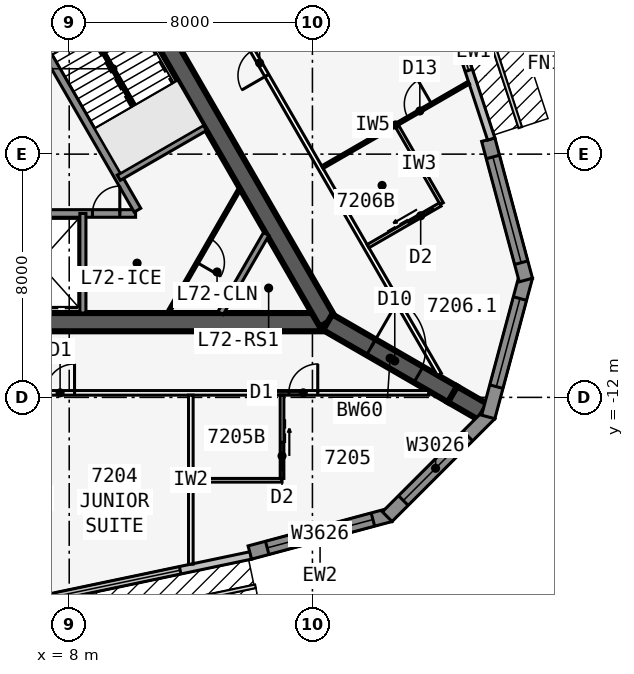
"""IFC4 building model, lengths in metres.
Left out: names, types, materials, properties, quantities, classifications, styles, units other than length and angle.
Written with IfcOpenShell. Run it as: python <this file> out.ifc"""

import sys

from ifc_helpers import new_model, si_unit, direction, frame, frame_2d, origin, place, context, subcontext, project, spatial, polyline, rectangle, outline, extrude, element, fill, save


model = new_model("IFC4")
c1 = context("Model", 3, precision=1e-05, world=origin(), true_north=direction((0.0, 1.0)))
c2 = subcontext(c1, "Body", "Model", "MODEL_VIEW")
j1 = project(units=[si_unit("LENGTHUNIT", "METRE"), si_unit("PLANEANGLEUNIT", "RADIAN")], contexts=[c1])
p1 = place(None, origin())
s1 = spatial("IfcSite", under=j1, at=p1, CompositionType="ELEMENT")
p2 = place(p1, origin())
s2 = spatial("IfcBuilding", under=s1, at=p2, CompositionType="ELEMENT")
p3 = place(p2, frame((0.0, 0.0, 271.7)))
s3 = spatial("IfcBuildingStorey", under=s2, at=p3, CompositionType="ELEMENT", Elevation=271.7)
p4 = place(p3, frame((-16.5, -9.526, 0.0), z_axis=(0.0, 0.0, 1.0), x_axis=(1.0, 0.0, 0.0)))
e1 = element("IfcWall", 1, at=p4, inside=s3, PredefinedType="SHEAR", context=c2, shape_type="SweptSolid", body=[
    extrude(rectangle(XDim=33.0, YDim=0.6, at=frame_2d((16.5, 0.0))), origin(), (0.0, 0.0, 1.0), 3.6),
])
p5 = place(p4, frame((14.05, 0.0, 0.0)))
e2 = element("IfcOpeningElement", 2, at=p5, cuts=e1, PredefinedType="OPENING", context=c2, shape_type="SweptSolid", body=[
    extrude(rectangle(XDim=1.8, YDim=2.13, at=frame_2d((0.9, 1.065))), frame((0.0, 0.31, 0.0), z_axis=(0.0, -1.0, 0.0), x_axis=(1.0, 0.0, 0.0)), (0.0, 0.0, 1.0), 0.62),
])
p6 = place(p3, frame((-0.55, -5.951, 0.0), z_axis=(0.0, 0.0, 1.0), x_axis=(1.0, 0.0, 0.0)))
e3 = element("IfcWall", 3, at=p6, inside=s3, PredefinedType="SOLIDWALL", context=c2, shape_type="SweptSolid", body=[
    extrude(rectangle(XDim=10.733, YDim=0.25, at=frame_2d((5.366, 0.0))), origin(), (0.0, 0.0, 1.0), 3.35),
])
p7 = place(p6, frame((9.314, 0.0, 0.0)))
e4 = element("IfcOpeningElement", 4, at=p7, cuts=e3, PredefinedType="OPENING", context=c2, shape_type="SweptSolid", body=[
    extrude(rectangle(XDim=0.9, YDim=2.13, at=frame_2d((0.45, 1.065))), frame((0.0, 0.135, 0.0), z_axis=(0.0, -1.0, 0.0), x_axis=(1.0, 0.0, 0.0)), (0.0, 0.0, 1.0), 0.27),
])
p8 = place(p6, frame((1.05, 0.0, 0.0)))
e5 = element("IfcOpeningElement", 5, at=p8, cuts=e3, PredefinedType="OPENING", context=c2, shape_type="SweptSolid", body=[
    extrude(rectangle(XDim=1.1, YDim=2.13, at=frame_2d((0.55, 1.065))), frame((0.0, 0.135, 0.0), z_axis=(0.0, -1.0, 0.0), x_axis=(1.0, 0.0, 0.0)), (0.0, 0.0, 1.0), 0.27),
])
p9 = place(p6, frame((4.05, 0.0, 0.0)))
e6 = element("IfcOpeningElement", 6, at=p9, cuts=e3, PredefinedType="OPENING", context=c2, shape_type="SweptSolid", body=[
    extrude(rectangle(XDim=1.1, YDim=2.13, at=frame_2d((0.55, 1.065))), frame((0.0, 0.135, 0.0), z_axis=(0.0, -1.0, 0.0), x_axis=(1.0, 0.0, 0.0)), (0.0, 0.0, 1.0), 0.27),
])
p10 = place(p3, frame((8.45, -5.951, 0.0), z_axis=(0.0, 0.0, 1.0), x_axis=(0.0, -1.0, 0.0)))
e7 = element("IfcWall", 7, at=p10, inside=s3, PredefinedType="SOLIDWALL", context=c2, shape_type="SweptSolid", body=[
    extrude(rectangle(XDim=3.275, YDim=0.2, at=frame_2d((1.637, 0.0))), origin(), (0.0, 0.0, 1.0), 3.35),
])
p11 = place(p3, frame((16.5, -9.526, 0.0), z_axis=(0.0, 0.0, 1.0), x_axis=(-0.499999749417, 0.866025548458, 0.0)))
e8 = element("IfcWall", 8, at=p11, inside=s3, PredefinedType="SHEAR", context=c2, shape_type="SweptSolid", body=[
    extrude(rectangle(XDim=33.0, YDim=0.6, at=frame_2d((16.5, 0.0))), origin(), (0.0, 0.0, 1.0), 3.6),
])
p12 = place(p11, frame((14.15, 0.0, 0.0)))
e9 = element("IfcOpeningElement", 9, at=p12, cuts=e8, PredefinedType="OPENING", context=c2, shape_type="SweptSolid", body=[
    extrude(rectangle(XDim=1.8, YDim=2.13, at=frame_2d((0.9, 1.065))), frame((0.0, 0.31, 0.0), z_axis=(0.0, -1.0, 0.0), x_axis=(1.0, 0.0, 0.0)), (0.0, 0.0, 1.0), 0.62),
])
p13 = place(p11, frame((12.6, 0.0, 0.0)))
e10 = element("IfcOpeningElement", 10, at=p13, cuts=e8, PredefinedType="OPENING", context=c2, shape_type="SweptSolid", body=[
    extrude(rectangle(XDim=1.0, YDim=2.13, at=frame_2d((0.5, 1.065))), frame((0.0, 0.31, 0.0), z_axis=(0.0, -1.0, 0.0), x_axis=(1.0, 0.0, 0.0)), (0.0, 0.0, 1.0), 0.62),
])
p14 = place(p3, frame((10.245, -5.843, 0.0), z_axis=(0.0, 0.0, 1.0), x_axis=(-0.499993009313, 0.866029439822, 0.0)))
e11 = element("IfcWall", 11, at=p14, inside=s3, PredefinedType="SOLIDWALL", context=c2, shape_type="SweptSolid", body=[
    extrude(rectangle(XDim=7.733, YDim=0.25, at=frame_2d((3.866, 0.0))), origin(), (0.0, 0.0, 1.0), 3.35),
])
p15 = place(p3, frame((9.629, -4.775, 0.0), z_axis=(0.0, 0.0, 1.0), x_axis=(0.865995643347, 0.500051543047, 0.0)))
e12 = element("IfcWall", 12, at=p15, inside=s3, PredefinedType="SOLIDWALL", context=c2, shape_type="SweptSolid", body=[
    extrude(rectangle(XDim=3.275, YDim=0.2, at=frame_2d((1.638, 0.0))), origin(), (0.0, 0.0, 1.0), 3.35),
])
p16 = place(p3, frame((16.5, -9.526, 0.0), z_axis=(0.0, 0.0, 1.0), x_axis=(0.866031398331, -0.499989616998, 0.0)))
e13 = element("IfcWall", 13, at=p16, inside=s3, PredefinedType="SHEAR", context=c2, shape_type="SweptSolid", body=[
    extrude(rectangle(XDim=4.746, YDim=0.6, at=frame_2d((2.373, 0.0))), origin(), (0.0, 0.0, 1.0), 3.6),
])
p17 = place(p16, frame((1.65, 0.0, 0.0)))
e14 = element("IfcOpeningElement", 14, at=p17, cuts=e13, PredefinedType="OPENING", context=c2, shape_type="SweptSolid", body=[
    extrude(rectangle(XDim=1.8, YDim=2.13, at=frame_2d((0.9, 1.065))), frame((0.0, 0.31, 0.0), z_axis=(0.0, -1.0, 0.0), x_axis=(1.0, 0.0, 0.0)), (0.0, 0.0, 1.0), 0.62),
])
p18 = place(p3, frame((20.61, -11.899, 0.0), z_axis=(0.0, 0.0, 1.0), x_axis=(0.866009537788, -0.500027479704, 0.0)))
e15 = element("IfcWall", 15, at=p18, inside=s3, PredefinedType="SHEAR", context=c2, shape_type="SweptSolid", body=[
    extrude(rectangle(XDim=1.155, YDim=0.6, at=frame_2d((0.577, 0.0))), origin(), (0.0, 0.0, 1.0), 3.6),
])
p19 = place(p3, frame((6.974, -18.668, 0.0), z_axis=(0.0, 0.0, 1.0), x_axis=(0.978654320409, 0.205513311355, 0.0)))
e16 = element("IfcWall", 16, at=p19, inside=s3, PredefinedType="STANDARD", context=c2, shape_type="SweptSolid", body=[
    extrude(rectangle(XDim=7.153, YDim=0.25, at=frame_2d((3.576, 0.0))), origin(), (0.0, 0.0, 1.0), 3.35),
])
p20 = place(p19, frame((0.577, 0.0, 0.45)))
e17 = element("IfcOpeningElement", 17, at=p20, cuts=e16, PredefinedType="OPENING", context=c2, shape_type="SweptSolid", body=[
    extrude(rectangle(XDim=4.2, YDim=2.6, at=frame_2d((2.1, 1.3))), frame((0.0, 0.135, 0.0), z_axis=(0.0, -1.0, 0.0), x_axis=(1.0, 0.0, 0.0)), (0.0, 0.0, 1.0), 0.27),
])
p21 = place(p3, frame((13.942, -17.103, 0.0), z_axis=(0.0, 0.0, 1.0), x_axis=(0.965913862671, 0.258863689806, 0.0)))
e18 = element("IfcWall", 18, at=p21, inside=s3, PredefinedType="SOLIDWALL", context=c2, shape_type="SweptSolid", body=[
    extrude(rectangle(XDim=4.782, YDim=0.45, at=frame_2d((2.391, 0.0))), origin(), (0.0, 0.0, 1.0), 3.35),
])
p22 = place(p21, frame((0.591, 0.0, 0.45)))
e19 = element("IfcOpeningElement", 19, at=p22, cuts=e18, PredefinedType="OPENING", context=c2, shape_type="SweptSolid", body=[
    extrude(rectangle(XDim=3.6, YDim=2.6, at=frame_2d((1.8, 1.3))), frame((0.0, 0.235, 0.0), z_axis=(0.0, -1.0, 0.0), x_axis=(1.0, 0.0, 0.0)), (0.0, 0.0, 1.0), 0.47),
])
p23 = place(p3, frame((18.46, -15.924, 0.0), z_axis=(0.0, 0.0, 1.0), x_axis=(0.707081252484, 0.707132308968, 0.0)))
e20 = element("IfcWall", 20, at=p23, inside=s3, PredefinedType="SOLIDWALL", context=c2, shape_type="SweptSolid", body=[
    extrude(outline(polyline([(4.782, 0.225), (4.723, 0.225), (4.375, 0.132), (4.351, 0.225), (0.0, 0.225), (0.0, -0.225), (4.782, -0.225), (4.782, 0.225)])), origin(), (0.0, 0.0, 1.0), 3.35),
])
p24 = place(p23, frame((0.75, 0.0, 0.45)))
e21 = element("IfcOpeningElement", 21, at=p24, cuts=e20, PredefinedType="OPENING", context=c2, shape_type="SweptSolid", body=[
    extrude(rectangle(XDim=3.0, YDim=2.6, at=frame_2d((1.5, 1.3))), frame((0.0, 0.235, 0.0), z_axis=(0.0, -1.0, 0.0), x_axis=(1.0, 0.0, 0.0)), (0.0, 0.0, 1.0), 0.47),
])
p25 = place(p3, frame((21.783, -12.644, 0.0), z_axis=(0.0, 0.0, 1.0), x_axis=(0.25880328844, 0.965930048136, 0.0)))
e22 = element("IfcWall", 22, at=p25, inside=s3, PredefinedType="SOLIDWALL", context=c2, shape_type="SweptSolid", body=[
    extrude(outline(polyline([(4.782, 0.225), (0.431, 0.225), (0.406, 0.132), (0.06, 0.225), (0.0, 0.225), (0.0, -0.225), (4.782, -0.225), (4.782, 0.225)])), origin(), (0.0, 0.0, 1.0), 3.35),
])
p26 = place(p25, frame((1.031, 0.0, 0.45)))
e23 = element("IfcOpeningElement", 23, at=p26, cuts=e22, PredefinedType="OPENING", context=c2, shape_type="SweptSolid", body=[
    extrude(rectangle(XDim=3.0, YDim=2.6, at=frame_2d((1.5, 1.3))), frame((0.0, 0.235, 0.0), z_axis=(0.0, -1.0, 0.0), x_axis=(1.0, 0.0, 0.0)), (0.0, 0.0, 1.0), 0.47),
])
p27 = place(p3, frame((23.02, -8.141, 0.0), z_axis=(0.0, 0.0, 1.0), x_axis=(-0.25880328844, 0.965930048136, 0.0)))
e24 = element("IfcWall", 24, at=p27, inside=s3, PredefinedType="SOLIDWALL", context=c2, shape_type="SweptSolid", body=[
    extrude(rectangle(XDim=4.782, YDim=0.45, at=frame_2d((2.391, 0.0))), origin(), (0.0, 0.0, 1.0), 3.35),
])
p28 = place(p27, frame((0.591, 0.0, 0.45)))
e25 = element("IfcOpeningElement", 25, at=p28, cuts=e24, PredefinedType="OPENING", context=c2, shape_type="SweptSolid", body=[
    extrude(rectangle(XDim=3.6, YDim=2.6, at=frame_2d((1.8, 1.3))), frame((0.0, 0.235, 0.0), z_axis=(0.0, -1.0, 0.0), x_axis=(1.0, 0.0, 0.0)), (0.0, 0.0, 1.0), 0.47),
])
p29 = place(p3, frame((21.881, -3.503, 0.0), z_axis=(0.0, 0.0, 1.0), x_axis=(-0.311328857048, 0.95030223759, 0.0)))
e26 = element("IfcWall", 26, at=p29, inside=s3, PredefinedType="STANDARD", context=c2, shape_type="SweptSolid", body=[
    extrude(rectangle(XDim=7.153, YDim=0.25, at=frame_2d((3.576, 0.0))), origin(), (0.0, 0.0, 1.0), 3.35),
])
p30 = place(p29, frame((2.376, 0.0, 0.45)))
e27 = element("IfcOpeningElement", 27, at=p30, cuts=e26, PredefinedType="OPENING", context=c2, shape_type="SweptSolid", body=[
    extrude(rectangle(XDim=4.2, YDim=2.6, at=frame_2d((2.1, 1.3))), frame((0.0, 0.135, 0.0), z_axis=(0.0, -1.0, 0.0), x_axis=(1.0, 0.0, 0.0)), (0.0, 0.0, 1.0), 0.27),
])
p31 = place(p3, frame((-19.827, -11.851, 0.0), z_axis=(0.0, 0.0, 1.0), x_axis=(1.0, 0.0, 0.0)))
e28 = element("IfcWall", 28, at=p31, inside=s3, PredefinedType="PARTITIONING", context=c2, shape_type="SweptSolid", body=[
    extrude(rectangle(XDim=39.654, YDim=0.15, at=frame_2d((19.827, 0.0))), origin(), (0.0, 0.0, 1.0), 3.35),
])
p32 = place(p31, frame((3.652, 0.0, 0.0)))
e29 = element("IfcOpeningElement", 29, at=p32, cuts=e28, PredefinedType="OPENING", context=c2, shape_type="SweptSolid", body=[
    extrude(rectangle(XDim=0.95, YDim=2.13, at=frame_2d((0.475, 1.065))), frame((0.0, 0.085, 0.0), z_axis=(0.0, -1.0, 0.0), x_axis=(1.0, 0.0, 0.0)), (0.0, 0.0, 1.0), 0.17),
])
p33 = place(p31, frame((11.052, 0.0, 0.0)))
e30 = element("IfcOpeningElement", 30, at=p33, cuts=e28, PredefinedType="OPENING", context=c2, shape_type="SweptSolid", body=[
    extrude(rectangle(XDim=0.95, YDim=2.13, at=frame_2d((0.475, 1.065))), frame((0.0, 0.085, 0.0), z_axis=(0.0, -1.0, 0.0), x_axis=(1.0, 0.0, 0.0)), (0.0, 0.0, 1.0), 0.17),
])
p34 = place(p31, frame((19.052, 0.0, 0.0)))
e31 = element("IfcOpeningElement", 31, at=p34, cuts=e28, PredefinedType="OPENING", context=c2, shape_type="SweptSolid", body=[
    extrude(rectangle(XDim=0.95, YDim=2.13, at=frame_2d((0.475, 1.065))), frame((0.0, 0.085, 0.0), z_axis=(0.0, -1.0, 0.0), x_axis=(1.0, 0.0, 0.0)), (0.0, 0.0, 1.0), 0.17),
])
p35 = place(p31, frame((27.052, 0.0, 0.0)))
e32 = element("IfcOpeningElement", 32, at=p35, cuts=e28, PredefinedType="OPENING", context=c2, shape_type="SweptSolid", body=[
    extrude(rectangle(XDim=0.95, YDim=2.13, at=frame_2d((0.475, 1.065))), frame((0.0, 0.085, 0.0), z_axis=(0.0, -1.0, 0.0), x_axis=(1.0, 0.0, 0.0)), (0.0, 0.0, 1.0), 0.17),
])
p36 = place(p31, frame((35.052, 0.0, 0.0)))
e33 = element("IfcOpeningElement", 33, at=p36, cuts=e28, PredefinedType="OPENING", context=c2, shape_type="SweptSolid", body=[
    extrude(rectangle(XDim=0.95, YDim=2.13, at=frame_2d((0.475, 1.065))), frame((0.0, 0.085, 0.0), z_axis=(0.0, -1.0, 0.0), x_axis=(1.0, 0.0, 0.0)), (0.0, 0.0, 1.0), 0.17),
])
p37 = place(p3, frame((12.0, -11.926, 0.0), z_axis=(0.0, 0.0, 1.0), x_axis=(0.0, -1.0, 0.0)))
e34 = element("IfcWall", 34, at=p37, inside=s3, PredefinedType="PARTITIONING", context=c2, shape_type="SweptSolid", body=[
    extrude(rectangle(XDim=5.559, YDim=0.15, at=frame_2d((2.779, 0.0))), origin(), (0.0, 0.0, 1.0), 2.301),
])
p38 = place(p3, frame((12.0, -14.726, 0.0), z_axis=(0.0, 0.0, 1.0), x_axis=(1.0, 0.0, 0.0)))
e35 = element("IfcWall", 35, at=p38, inside=s3, PredefinedType="PLUMBINGWALL", context=c2, shape_type="SweptSolid", body=[
    extrude(rectangle(XDim=3.0, YDim=0.12, at=frame_2d((1.5, 0.0))), origin(), (0.0, 0.0, 1.0), 3.35),
])
p39 = place(p3, frame((15.0, -11.926, 0.0), z_axis=(0.0, 0.0, 1.0), x_axis=(0.0, -1.0, 0.0)))
e36 = element("IfcWall", 36, at=p39, inside=s3, PredefinedType="PLUMBINGWALL", context=c2, shape_type="SweptSolid", body=[
    extrude(rectangle(XDim=2.74, YDim=0.12, at=frame_2d((1.37, 0.0))), origin(), (0.0, 0.0, 1.0), 3.35),
])
p40 = place(p39, frame((1.55, 0.0, 0.0)))
e37 = element("IfcOpeningElement", 37, at=p40, cuts=e36, PredefinedType="OPENING", context=c2, shape_type="SweptSolid", body=[
    extrude(rectangle(XDim=0.9, YDim=2.13, at=frame_2d((0.45, 1.065))), frame((0.0, 0.07, 0.0), z_axis=(0.0, -1.0, 0.0), x_axis=(1.0, 0.0, 0.0)), (0.0, 0.0, 1.0), 0.14),
])
p41 = place(p3, frame((20.177, -11.245, 0.0), z_axis=(0.0, 0.0, 1.0), x_axis=(-0.499998875317, 0.866026053119, 0.0)))
e38 = element("IfcWall", 38, at=p41, inside=s3, PredefinedType="PARTITIONING", context=c2, shape_type="SweptSolid", body=[
    extrude(rectangle(XDim=39.654, YDim=0.15, at=frame_2d((19.827, 0.0))), origin(), (0.0, 0.0, 1.0), 3.35),
])
p42 = place(p41, frame((11.352, 0.0, 0.0)))
e39 = element("IfcOpeningElement", 39, at=p42, cuts=e38, PredefinedType="OPENING", context=c2, shape_type="SweptSolid", body=[
    extrude(rectangle(XDim=0.95, YDim=2.13, at=frame_2d((0.475, 1.065))), frame((0.0, 0.085, 0.0), z_axis=(0.0, -1.0, 0.0), x_axis=(1.0, 0.0, 0.0)), (0.0, 0.0, 1.0), 0.17),
])
p43 = place(p3, frame((16.329, -4.429, 0.0), z_axis=(0.0, 0.0, 1.0), x_axis=(0.866029066823, 0.499993655377, 0.0)))
e40 = element("IfcWall", 40, at=p43, inside=s3, PredefinedType="PARTITIONING", context=c2, shape_type="SweptSolid", body=[
    extrude(rectangle(XDim=5.559, YDim=0.1, at=frame_2d((2.779, 0.0))), origin(), (0.0, 0.0, 1.0), 2.301),
])
p44 = place(p43, frame((3.25, 0.0, 0.0)))
e41 = element("IfcOpeningElement", 41, at=p44, cuts=e40, PredefinedType="OPENING", context=c2, shape_type="SweptSolid", body=[
    extrude(rectangle(XDim=0.9, YDim=2.13, at=frame_2d((0.45, 1.065))), frame((0.0, 0.06, 0.0), z_axis=(0.0, -1.0, 0.0), x_axis=(1.0, 0.0, 0.0)), (0.0, 0.0, 1.0), 0.12),
])
p45 = place(p3, frame((20.253, -5.627, 0.0), z_axis=(0.0, 0.0, 1.0), x_axis=(-0.50002537861, 0.866010750942, 0.0)))
e42 = element("IfcWall", 42, at=p45, inside=s3, PredefinedType="PLUMBINGWALL", context=c2, shape_type="SweptSolid", body=[
    extrude(rectangle(XDim=3.0, YDim=0.12, at=frame_2d((1.5, 0.0))), origin(), (0.0, 0.0, 1.0), 3.35),
])
p46 = place(p3, frame((17.829, -7.027, 0.0), z_axis=(0.0, 0.0, 1.0), x_axis=(0.866035715982, 0.499982138324, 0.0)))
e43 = element("IfcWall", 43, at=p46, inside=s3, PredefinedType="PLUMBINGWALL", context=c2, shape_type="SweptSolid", body=[
    extrude(rectangle(XDim=2.74, YDim=0.12, at=frame_2d((1.37, 0.0))), origin(), (0.0, 0.0, 1.0), 3.35),
])
p47 = place(p46, frame((1.55, 0.0, 0.0)))
e44 = element("IfcOpeningElement", 44, at=p47, cuts=e43, PredefinedType="OPENING", context=c2, shape_type="SweptSolid", body=[
    extrude(rectangle(XDim=0.9, YDim=2.13, at=frame_2d((0.45, 1.065))), frame((0.0, 0.07, 0.0), z_axis=(0.0, -1.0, 0.0), x_axis=(1.0, 0.0, 0.0)), (0.0, 0.0, 1.0), 0.14),
])
p48 = place(p3, frame((14.479, -6.626, 0.0), z_axis=(0.0, 0.0, 1.0), x_axis=(-0.499952404951, -0.866052881055, 0.0)))
e45 = element("IfcWall", 45, at=p48, inside=s3, PredefinedType="SOLIDWALL", context=c2, shape_type="SweptSolid", body=[
    extrude(rectangle(XDim=3.002, YDim=0.2, at=frame_2d((1.501, 0.0))), origin(), (0.0, 0.0, 1.0), 3.35),
])
p49 = place(p3, frame((13.613, -5.126, 0.0), z_axis=(0.0, 0.0, 1.0), x_axis=(-0.499999210213, -0.866025859768, 0.0)))
e46 = element("IfcWall", 46, at=p49, inside=s3, PredefinedType="PARTITIONING", context=c2, shape_type="SweptSolid", body=[
    extrude(rectangle(XDim=4.734, YDim=0.1, at=frame_2d((2.367, 0.0))), origin(), (0.0, 0.0, 1.0), 3.35),
])
p50 = place(p49, frame((1.917, 0.0, 0.0)))
e47 = element("IfcOpeningElement", 47, at=p50, cuts=e46, PredefinedType="OPENING", context=c2, shape_type="SweptSolid", body=[
    extrude(rectangle(XDim=0.9, YDim=2.13, at=frame_2d((0.45, 1.065))), frame((0.0, 0.06, 0.0), z_axis=(0.0, -1.0, 0.0), x_axis=(1.0, 0.0, 0.0)), (0.0, 0.0, 1.0), 0.12),
])
p51 = place(p3, frame((10.135, -2.401, 0.0), z_axis=(0.0, 0.0, 1.0), x_axis=(-0.499992232847, 0.866029888106, 0.0)))
e48 = element("IfcWall", 48, at=p51, inside=s3, PredefinedType="SOLIDWALL", context=c2, shape_type="SweptSolid", body=[
    extrude(rectangle(XDim=2.794, YDim=0.1, at=frame_2d((1.397, 0.0))), origin(), (0.0, 0.0, 1.0), 3.6),
])
p52 = place(p20, origin())
e49 = element("IfcWindow", 49, at=p52, inside=s3, PartitioningType="SINGLE_PANEL", PredefinedType="WINDOW", context=c2, shape_type="SweptSolid", body=[
    extrude(rectangle(XDim=4.2, YDim=2.6, at=frame_2d((2.1, 1.3))), frame((0.0, 0.03, 0.0), z_axis=(0.0, -1.0, 0.0), x_axis=(1.0, 0.0, 0.0)), (0.0, 0.0, 1.0), 0.06),
])
fill(e17, e49)
p53 = place(p22, origin())
e50 = element("IfcWindow", 50, at=p53, inside=s3, PartitioningType="SINGLE_PANEL", PredefinedType="WINDOW", context=c2, shape_type="SweptSolid", body=[
    extrude(rectangle(XDim=3.6, YDim=2.6, at=frame_2d((1.8, 1.3))), frame((0.0, 0.03, 0.0), z_axis=(0.0, -1.0, 0.0), x_axis=(1.0, 0.0, 0.0)), (0.0, 0.0, 1.0), 0.06),
])
fill(e19, e50)
p54 = place(p24, origin())
e51 = element("IfcWindow", 51, at=p54, inside=s3, PartitioningType="SINGLE_PANEL", PredefinedType="WINDOW", context=c2, shape_type="SweptSolid", body=[
    extrude(rectangle(XDim=3.0, YDim=2.6, at=frame_2d((1.5, 1.3))), frame((0.0, 0.03, 0.0), z_axis=(0.0, -1.0, 0.0), x_axis=(1.0, 0.0, 0.0)), (0.0, 0.0, 1.0), 0.06),
])
fill(e21, e51)
p55 = place(p26, origin())
e52 = element("IfcWindow", 52, at=p55, inside=s3, PartitioningType="SINGLE_PANEL", PredefinedType="WINDOW", context=c2, shape_type="SweptSolid", body=[
    extrude(rectangle(XDim=3.0, YDim=2.6, at=frame_2d((1.5, 1.3))), frame((0.0, 0.03, 0.0), z_axis=(0.0, -1.0, 0.0), x_axis=(1.0, 0.0, 0.0)), (0.0, 0.0, 1.0), 0.06),
])
fill(e23, e52)
p56 = place(p28, origin())
e53 = element("IfcWindow", 53, at=p56, inside=s3, PartitioningType="SINGLE_PANEL", PredefinedType="WINDOW", context=c2, shape_type="SweptSolid", body=[
    extrude(rectangle(XDim=3.6, YDim=2.6, at=frame_2d((1.8, 1.3))), frame((0.0, 0.03, 0.0), z_axis=(0.0, -1.0, 0.0), x_axis=(1.0, 0.0, 0.0)), (0.0, 0.0, 1.0), 0.06),
])
fill(e25, e53)
p57 = place(p30, origin())
e54 = element("IfcWindow", 54, at=p57, inside=s3, PartitioningType="SINGLE_PANEL", PredefinedType="WINDOW", context=c2, shape_type="SweptSolid", body=[
    extrude(rectangle(XDim=4.2, YDim=2.6, at=frame_2d((2.1, 1.3))), frame((0.0, 0.03, 0.0), z_axis=(0.0, -1.0, 0.0), x_axis=(1.0, 0.0, 0.0)), (0.0, 0.0, 1.0), 0.06),
])
fill(e27, e54)
p58 = place(p35, origin())
e55 = element("IfcDoor", 55, at=p58, inside=s3, OperationType="SINGLE_SWING_RIGHT", PredefinedType="DOOR", context=c2, shape_type="SweptSolid", body=[
    extrude(rectangle(XDim=0.95, YDim=2.13, at=frame_2d((0.475, 1.065))), frame((0.0, 0.025, 0.0), z_axis=(0.0, -1.0, 0.0), x_axis=(1.0, 0.0, 0.0)), (0.0, 0.0, 1.0), 0.05),
])
fill(e32, e55)
p59 = place(p40, origin())
e56 = element("IfcDoor", 56, at=p59, inside=s3, OperationType="SLIDING_TO_LEFT", PredefinedType="DOOR", context=c2, shape_type="SweptSolid", body=[
    extrude(rectangle(XDim=0.9, YDim=2.13, at=frame_2d((0.45, 1.065))), frame((0.0, 0.025, 0.0), z_axis=(0.0, -1.0, 0.0), x_axis=(1.0, 0.0, 0.0)), (0.0, 0.0, 1.0), 0.05),
])
fill(e37, e56)
p60 = place(p36, origin())
e57 = element("IfcDoor", 57, at=p60, inside=s3, OperationType="SINGLE_SWING_RIGHT", PredefinedType="DOOR", context=c2, shape_type="SweptSolid", body=[
    extrude(rectangle(XDim=0.95, YDim=2.13, at=frame_2d((0.475, 1.065))), frame((0.0, 0.025, 0.0), z_axis=(0.0, -1.0, 0.0), x_axis=(1.0, 0.0, 0.0)), (0.0, 0.0, 1.0), 0.05),
])
fill(e33, e57)
p61 = place(p44, origin())
e58 = element("IfcDoor", 58, at=p61, inside=s3, OperationType="SINGLE_SWING_RIGHT", PredefinedType="DOOR", context=c2, shape_type="SweptSolid", body=[
    extrude(rectangle(XDim=0.9, YDim=2.13, at=frame_2d((0.45, 1.065))), frame((0.0, 0.025, 0.0), z_axis=(0.0, -1.0, 0.0), x_axis=(1.0, 0.0, 0.0)), (0.0, 0.0, 1.0), 0.05),
])
fill(e41, e58)
p62 = place(p47, origin())
e59 = element("IfcDoor", 59, at=p62, inside=s3, OperationType="SLIDING_TO_LEFT", PredefinedType="DOOR", context=c2, shape_type="SweptSolid", body=[
    extrude(rectangle(XDim=0.9, YDim=2.13, at=frame_2d((0.45, 1.065))), frame((0.0, 0.025, 0.0), z_axis=(0.0, -1.0, 0.0), x_axis=(1.0, 0.0, 0.0)), (0.0, 0.0, 1.0), 0.05),
])
fill(e44, e59)
p63 = place(p42, origin())
e60 = element("IfcDoor", 60, at=p63, inside=s3, OperationType="SINGLE_SWING_LEFT", PredefinedType="DOOR", context=c2, shape_type="SweptSolid", body=[
    extrude(rectangle(XDim=0.95, YDim=2.13, at=frame_2d((0.475, 1.065))), frame((0.0, 0.025, 0.0), z_axis=(0.0, -1.0, 0.0), x_axis=(1.0, 0.0, 0.0)), (0.0, 0.0, 1.0), 0.05),
])
fill(e39, e60)
p64 = place(p17, origin())
e61 = element("IfcDoor", 61, at=p64, inside=s3, OperationType="DOUBLE_DOOR_DOUBLE_SWING", PredefinedType="DOOR", context=c2, shape_type="SweptSolid", body=[
    extrude(rectangle(XDim=1.8, YDim=2.13, at=frame_2d((0.9, 1.065))), frame((0.0, 0.025, 0.0), z_axis=(0.0, -1.0, 0.0), x_axis=(1.0, 0.0, 0.0)), (0.0, 0.0, 1.0), 0.05),
])
fill(e14, e61)
p65 = place(p50, origin())
e62 = element("IfcDoor", 62, at=p65, inside=s3, OperationType="SINGLE_SWING_RIGHT", PredefinedType="DOOR", context=c2, shape_type="SweptSolid", body=[
    extrude(rectangle(XDim=0.9, YDim=2.13, at=frame_2d((0.45, 1.065))), frame((0.0, 0.025, 0.0), z_axis=(0.0, -1.0, 0.0), x_axis=(1.0, 0.0, 0.0)), (0.0, 0.0, 1.0), 0.05),
])
fill(e47, e62)
p66 = place(p7, origin())
e63 = element("IfcDoor", 63, at=p66, inside=s3, OperationType="SINGLE_SWING_RIGHT", PredefinedType="DOOR", context=c2, shape_type="SweptSolid", body=[
    extrude(rectangle(XDim=0.9, YDim=2.13, at=frame_2d((0.45, 1.065))), frame((0.0, 0.025, 0.0), z_axis=(0.0, -1.0, 0.0), x_axis=(1.0, 0.0, 0.0)), (0.0, 0.0, 1.0), 0.05),
])
fill(e4, e63)
save(model, sys.argv[1])
